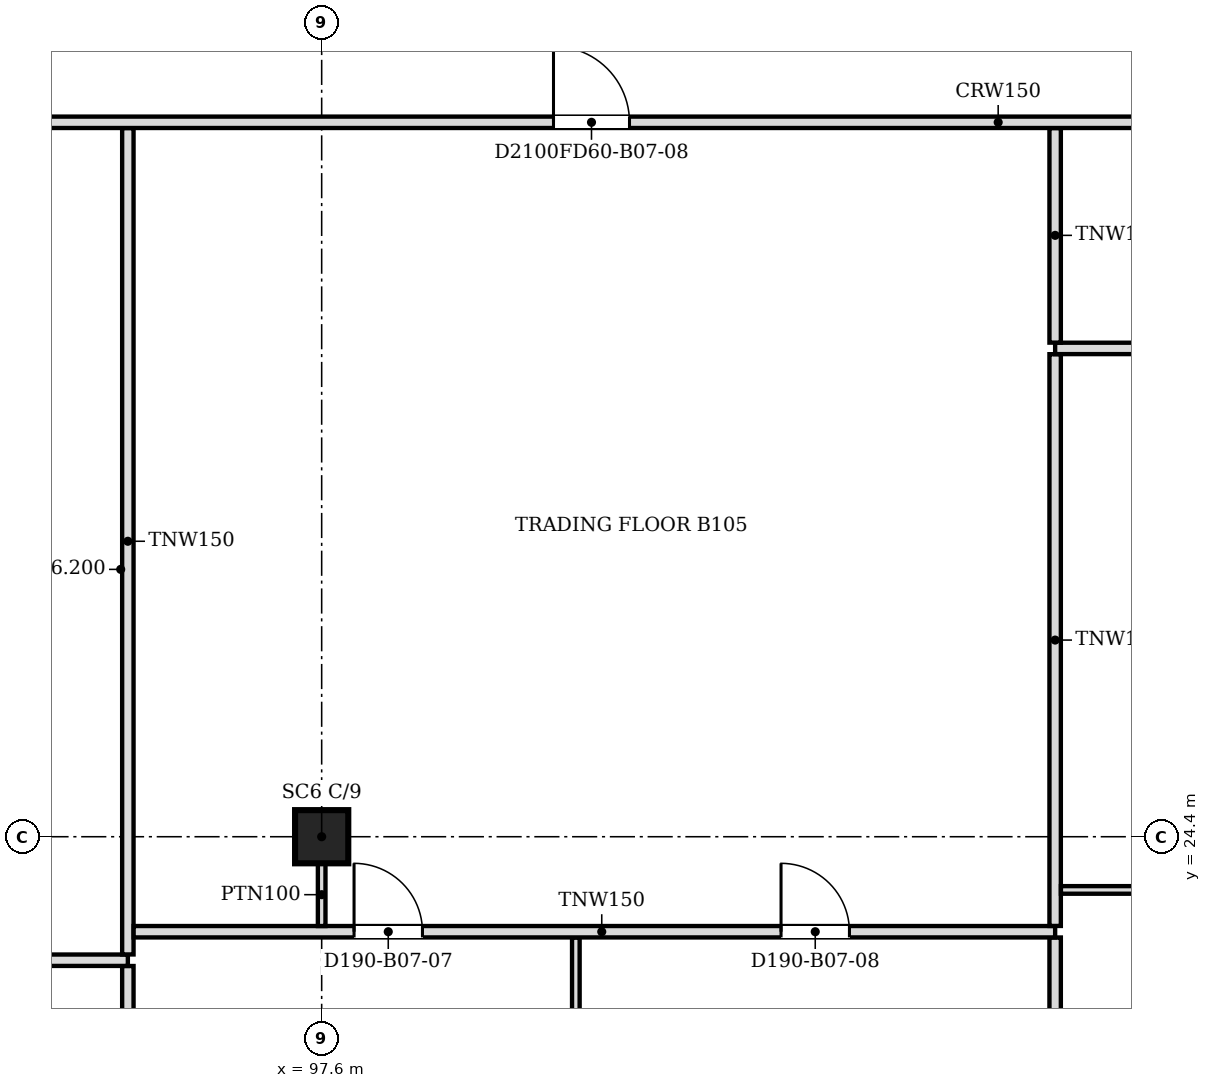
"""IFC4 building model, lengths in metres.
Left out: names, types, materials, properties, quantities, classifications, styles, units other than length and angle.
Written with IfcOpenShell. Run it as: python <this file> out.ifc"""

import sys

from ifc_helpers import new_model, si_unit, direction, frame, frame_2d, origin, origin_2d, place, context, subcontext, project, spatial, rectangle, extrude, source, transform, mapped, element, fill, save


model = new_model("IFC4")
c1 = context("Model", 3, precision=1e-05, world=origin(), true_north=direction((0.0, 1.0)))
c2 = subcontext(c1, "Body", "Model", "MODEL_VIEW")
j1 = project(units=[si_unit("LENGTHUNIT", "METRE"), si_unit("PLANEANGLEUNIT", "RADIAN")], contexts=[c1])
p1 = place(None, origin())
s1 = spatial("IfcSite", under=j1, at=p1, CompositionType="ELEMENT")
p2 = place(p1, origin())
s2 = spatial("IfcBuilding", under=s1, at=p2, CompositionType="ELEMENT")
p3 = place(p2, frame((0.0, 0.0, 72.4)))
s3 = spatial("IfcBuildingStorey", under=s2, at=p3, CompositionType="ELEMENT", Elevation=72.4)
p4 = place(p3, frame((97.6, 24.4, 0.0), z_axis=(0.0, 0.0, 1.0), x_axis=(1.0, 0.0, 0.0)))
e1 = element("IfcColumn", 1, at=p4, inside=s3, PredefinedType="COLUMN", context=c2, shape_type="SweptSolid", body=[
    extrude(rectangle(XDim=0.7, YDim=0.7, at=origin_2d()), origin(), (0.0, 0.0, 1.0), 3.6),
])
p5 = place(p3, frame((95.05, 18.8, 0.0), z_axis=(0.0, 0.0, 1.0), x_axis=(0.0, 1.0, 0.0)))
e2 = element("IfcWall", 2, at=p5, inside=s3, PredefinedType="PARTITIONING", context=c2, shape_type="SweptSolid", body=[
    extrude(rectangle(XDim=3.899, YDim=0.15, at=frame_2d((1.949, 0.0))), origin(), (0.0, 0.0, 1.0), 3.067),
])
p6 = place(p3, frame((100.944, 18.8, 0.0), z_axis=(0.0, 0.0, 1.0), x_axis=(0.0, 1.0, 0.0)))
e3 = element("IfcWall", 3, at=p6, inside=s3, PredefinedType="PARTITIONING", context=c2, shape_type="SweptSolid", body=[
    extrude(rectangle(XDim=4.274, YDim=0.1, at=frame_2d((2.137, 0.0))), origin(), (0.0, 0.0, 1.0), 3.067),
])
p7 = place(p3, frame((107.25, 18.8, 0.0), z_axis=(0.0, 0.0, 1.0), x_axis=(0.0, 1.0, 0.0)))
e4 = element("IfcWall", 4, at=p7, inside=s3, PredefinedType="PARTITIONING", context=c2, shape_type="SweptSolid", body=[
    extrude(rectangle(XDim=4.274, YDim=0.15, at=frame_2d((2.137, 0.0))), origin(), (0.0, 0.0, 1.0), 3.067),
])
p8 = place(p3, frame((95.05, 22.775, 0.0), z_axis=(0.0, 0.0, 1.0), x_axis=(-1.0, 0.0, 0.0)))
e5 = element("IfcWall", 5, at=p8, inside=s3, PredefinedType="PARTITIONING", context=c2, shape_type="SweptSolid", body=[
    extrude(rectangle(XDim=8.487, YDim=0.15, at=frame_2d((4.244, 0.0))), origin(), (0.0, 0.0, 1.0), 3.067),
])
m1 = source(origin(), c2, "Body", "SweptSolid", [
    extrude(rectangle(XDim=0.9, YDim=2.1, at=frame_2d((0.45, 1.05))), frame((0.0, 0.085, 0.0), z_axis=(0.0, -1.0, 0.0), x_axis=(1.0, 0.0, 0.0)), (0.0, 0.0, 1.0), 0.17),
])
p9 = place(p8, frame((6.187, 0.0, 0.0)))
e6 = element("IfcOpeningElement", 6, at=p9, cuts=e5, PredefinedType="OPENING", context=c2, shape_type="MappedRepresentation", body=[
    mapped(m1, transform((0.0, 0.0, 0.0), scale=1.0)),
])
p10 = place(p8, frame((1.93, 0.0, 0.0)))
e7 = element("IfcOpeningElement", 7, at=p10, cuts=e5, PredefinedType="OPENING", context=c2, shape_type="MappedRepresentation", body=[
    mapped(m1, transform((0.0, 0.0, 0.0), scale=1.0)),
])
p11 = place(p3, frame((95.05, 22.851, 0.0), z_axis=(0.0, 0.0, 1.0), x_axis=(0.0, 1.0, 0.0)))
e8 = element("IfcWall", 8, at=p11, inside=s3, PredefinedType="PARTITIONING", context=c2, shape_type="SweptSolid", body=[
    extrude(rectangle(XDim=10.873, YDim=0.15, at=frame_2d((5.437, 0.0))), origin(), (0.0, 0.0, 1.0), 3.067),
])
p12 = place(p3, frame((107.25, 23.15, 0.0), z_axis=(0.0, 0.0, 1.0), x_axis=(-1.0, 0.0, 0.0)))
e9 = element("IfcWall", 9, at=p12, inside=s3, PredefinedType="PARTITIONING", context=c2, shape_type="SweptSolid", body=[
    extrude(rectangle(XDim=12.124, YDim=0.15, at=frame_2d((6.062, 0.0))), origin(), (0.0, 0.0, 1.0), 3.067),
])
p13 = place(p12, frame((8.324, 0.0, 0.0)))
e10 = element("IfcOpeningElement", 10, at=p13, cuts=e9, PredefinedType="OPENING", context=c2, shape_type="MappedRepresentation", body=[
    mapped(m1, transform((0.0, 0.0, 0.0), scale=1.0)),
])
p14 = place(p12, frame((2.706, 0.0, 0.0)))
e11 = element("IfcOpeningElement", 11, at=p14, cuts=e9, PredefinedType="OPENING", context=c2, shape_type="MappedRepresentation", body=[
    mapped(m1, transform((0.0, 0.0, 0.0), scale=1.0)),
])
p15 = place(p3, frame((107.25, 23.226, 0.0), z_axis=(0.0, 0.0, 1.0), x_axis=(0.0, 1.0, 0.0)))
e12 = element("IfcWall", 12, at=p15, inside=s3, PredefinedType="PARTITIONING", context=c2, shape_type="SweptSolid", body=[
    extrude(rectangle(XDim=7.523, YDim=0.15, at=frame_2d((3.761, 0.0))), origin(), (0.0, 0.0, 1.0), 3.067),
])
p16 = place(p3, frame((112.094, 23.7, 0.0), z_axis=(0.0, 0.0, 1.0), x_axis=(-1.0, 0.0, 0.0)))
e13 = element("IfcWall", 13, at=p16, inside=s3, PredefinedType="PARTITIONING", context=c2, shape_type="SweptSolid", body=[
    extrude(rectangle(XDim=4.768, YDim=0.1, at=frame_2d((2.384, 0.0))), origin(), (0.0, 0.0, 1.0), 3.067),
])
m2 = source(origin(), c2, "Body", "SweptSolid", [
    extrude(rectangle(XDim=0.9, YDim=2.1, at=frame_2d((0.45, 1.05))), frame((0.0, 0.06, 0.0), z_axis=(0.0, -1.0, 0.0), x_axis=(1.0, 0.0, 0.0)), (0.0, 0.0, 1.0), 0.12),
])
p17 = place(p16, frame((2.668, 0.0, 0.0)))
e14 = element("IfcOpeningElement", 14, at=p17, cuts=e13, PredefinedType="OPENING", context=c2, shape_type="MappedRepresentation", body=[
    mapped(m2, transform((0.0, 0.0, 0.0), scale=1.0)),
])
p18 = place(p3, frame((97.6, 24.05, 0.0), z_axis=(0.0, 0.0, 1.0), x_axis=(0.0, -1.0, 0.0)))
e15 = element("IfcWall", 15, at=p18, inside=s3, PredefinedType="PARTITIONING", context=c2, shape_type="SweptSolid", body=[
    extrude(rectangle(XDim=0.825, YDim=0.1, at=frame_2d((0.413, 0.0))), origin(), (0.0, 0.0, 1.0), 3.067),
])
p19 = place(p3, frame((116.4, 30.825, 0.0), z_axis=(0.0, 0.0, 1.0), x_axis=(-1.0, 0.0, 0.0)))
e16 = element("IfcWall", 16, at=p19, inside=s3, PredefinedType="PARTITIONING", context=c2, shape_type="SweptSolid", body=[
    extrude(rectangle(XDim=9.15, YDim=0.15, at=frame_2d((4.575, 0.0))), origin(), (0.0, 0.0, 1.0), 3.067),
])
p20 = place(p19, frame((4.15, 0.0, 0.0)))
e17 = element("IfcOpeningElement", 17, at=p20, cuts=e16, PredefinedType="OPENING", context=c2, shape_type="MappedRepresentation", body=[
    mapped(m1, transform((0.0, 0.0, 0.0), scale=1.0)),
])
p21 = place(p3, frame((107.25, 30.901, 0.0), z_axis=(0.0, 0.0, 1.0), x_axis=(0.0, 1.0, 0.0)))
e18 = element("IfcWall", 18, at=p21, inside=s3, PredefinedType="PARTITIONING", context=c2, shape_type="SweptSolid", body=[
    extrude(rectangle(XDim=2.823, YDim=0.15, at=frame_2d((1.412, 0.0))), origin(), (0.0, 0.0, 1.0), 3.067),
])
p22 = place(p3, frame((133.7, 33.8, 0.0), z_axis=(0.0, 0.0, 1.0), x_axis=(-1.0, 0.0, 0.0)))
e19 = element("IfcWall", 19, at=p22, inside=s3, PredefinedType="PARTITIONING", context=c2, shape_type="SweptSolid", body=[
    extrude(rectangle(XDim=47.8, YDim=0.15, at=frame_2d((23.9, 0.0))), origin(), (0.0, 0.0, 1.0), 3.067),
])
m3 = source(origin(), c2, "Body", "SweptSolid", [
    extrude(rectangle(XDim=1.0, YDim=2.1, at=frame_2d((0.5, 1.05))), frame((0.0, 0.085, 0.0), z_axis=(0.0, -1.0, 0.0), x_axis=(1.0, 0.0, 0.0)), (0.0, 0.0, 1.0), 0.17),
])
p23 = place(p22, frame((3.549, 0.0, 0.0)))
e20 = element("IfcOpeningElement", 20, at=p23, cuts=e19, PredefinedType="OPENING", context=c2, shape_type="MappedRepresentation", body=[
    mapped(m3, transform((0.0, 0.0, 0.0), scale=1.0)),
])
p24 = place(p22, frame((42.7, 0.0, 0.0)))
e21 = element("IfcOpeningElement", 21, at=p24, cuts=e19, PredefinedType="OPENING", context=c2, shape_type="MappedRepresentation", body=[
    mapped(m3, transform((0.0, 0.0, 0.0), scale=1.0)),
])
p25 = place(p22, frame((12.199, 0.0, 0.0)))
e22 = element("IfcOpeningElement", 22, at=p25, cuts=e19, PredefinedType="OPENING", context=c2, shape_type="MappedRepresentation", body=[
    mapped(m3, transform((0.0, 0.0, 0.0), scale=1.0)),
])
p26 = place(p22, frame((21.349, 0.0, 0.0)))
e23 = element("IfcOpeningElement", 23, at=p26, cuts=e19, PredefinedType="OPENING", context=c2, shape_type="MappedRepresentation", body=[
    mapped(m3, transform((0.0, 0.0, 0.0), scale=1.0)),
])
p27 = place(p22, frame((32.05, 0.0, 0.0)))
e24 = element("IfcOpeningElement", 24, at=p27, cuts=e19, PredefinedType="OPENING", context=c2, shape_type="MappedRepresentation", body=[
    mapped(m3, transform((0.0, 0.0, 0.0), scale=1.0)),
])
m4 = source(origin(), c2, "Body", "SweptSolid", [
    extrude(rectangle(XDim=0.9, YDim=2.1, at=frame_2d((0.45, 1.05))), frame((0.0, 0.025, 0.0), z_axis=(0.0, -1.0, 0.0), x_axis=(1.0, 0.0, 0.0)), (0.0, 0.0, 1.0), 0.05),
])
p28 = place(p13, origin())
e25 = element("IfcDoor", 25, at=p28, inside=s3, OperationType="SINGLE_SWING_RIGHT", PredefinedType="DOOR", context=c2, shape_type="MappedRepresentation", body=[
    mapped(m4, transform((0.0, 0.0, 0.0), scale=1.0)),
])
fill(e10, e25)
p29 = place(p14, origin())
e26 = element("IfcDoor", 26, at=p29, inside=s3, OperationType="SINGLE_SWING_RIGHT", PredefinedType="DOOR", context=c2, shape_type="MappedRepresentation", body=[
    mapped(m4, transform((0.0, 0.0, 0.0), scale=1.0)),
])
fill(e11, e26)
m5 = source(origin(), c2, "Body", "SweptSolid", [
    extrude(rectangle(XDim=1.0, YDim=2.1, at=frame_2d((0.5, 1.05))), frame((0.0, 0.025, 0.0), z_axis=(0.0, -1.0, 0.0), x_axis=(1.0, 0.0, 0.0)), (0.0, 0.0, 1.0), 0.05),
])
p30 = place(p27, origin())
e27 = element("IfcDoor", 27, at=p30, inside=s3, OperationType="SINGLE_SWING_RIGHT", PredefinedType="DOOR", context=c2, shape_type="MappedRepresentation", body=[
    mapped(m5, transform((0.0, 0.0, 0.0), scale=1.0)),
])
fill(e24, e27)
save(model, sys.argv[1])
